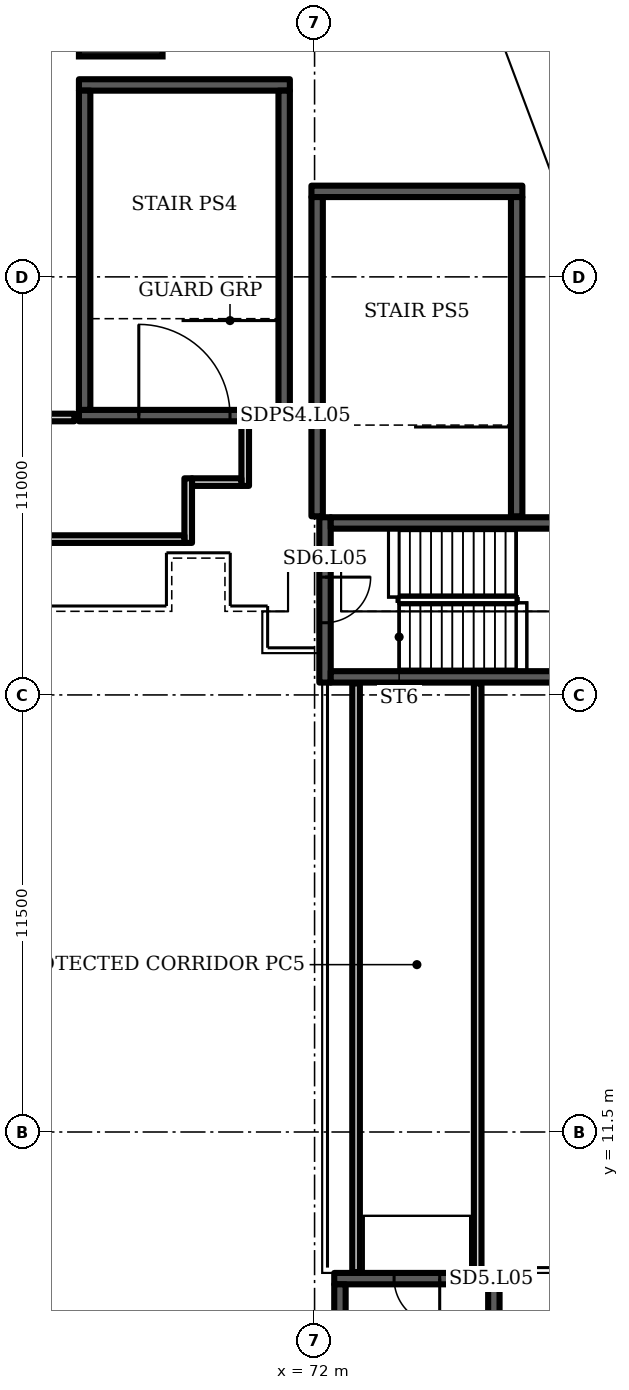
"""IFC4 building model, lengths in metres.
Left out: names, types, materials, properties, quantities, classifications, styles, units other than length and angle.
Written with IfcOpenShell. Run it as: python <this file> out.ifc"""

import sys

from ifc_helpers import new_model, si_unit, direction, frame, frame_2d, origin, origin_2d, place, context, subcontext, project, spatial, rectangle, extrude, element, fill, save


model = new_model("IFC4")
c1 = context("Model", 3, precision=1e-05, world=origin(), true_north=direction((0.0, 1.0)))
c2 = subcontext(c1, "Body", "Model", "MODEL_VIEW")
j1 = project(units=[si_unit("LENGTHUNIT", "METRE"), si_unit("PLANEANGLEUNIT", "RADIAN")], contexts=[c1])
p1 = place(None, origin())
s1 = spatial("IfcSite", under=j1, at=p1, CompositionType="ELEMENT")
p2 = place(p1, origin())
s2 = spatial("IfcBuilding", under=s1, at=p2, CompositionType="ELEMENT")
p3 = place(p2, frame((0.0, 0.0, 33.0)))
s3 = spatial("IfcBuildingStorey", under=s2, at=p3, CompositionType="ELEMENT", Elevation=33.0)
p4 = place(p3, frame((66.9, 40.9, 0.0), z_axis=(0.0, 0.0, 1.0), x_axis=(1.0, 0.0, 0.0)))
e1 = element("IfcColumn", 1, at=p4, inside=s3, PredefinedType="COLUMN", context=c2, shape_type="SweptSolid", body=[
    extrude(rectangle(XDim=2.2, YDim=2.2, at=origin_2d()), origin(), (0.0, 0.0, 1.0), 8.5),
])
p5 = place(p3, frame((72.518, 7.642, 0.0), z_axis=(0.0, 0.0, 1.0), x_axis=(1.0, 0.0, 0.0)))
e2 = element("IfcWall", 2, at=p5, inside=s3, PredefinedType="SHEAR", context=c2, shape_type="SweptSolid", body=[
    extrude(rectangle(XDim=4.35, YDim=0.3, at=frame_2d((2.175, 0.0))), origin(), (0.0, 0.0, 1.0), 8.1),
])
p6 = place(p5, frame((1.575, 0.0, 0.0)))
e3 = element("IfcOpeningElement", 3, at=p6, cuts=e2, PredefinedType="OPENING", context=c2, shape_type="SweptSolid", body=[
    extrude(rectangle(XDim=1.2, YDim=2.1, at=frame_2d((0.6, 1.05))), frame((0.0, 0.16, 0.0), z_axis=(0.0, -1.0, 0.0), x_axis=(1.0, 0.0, 0.0)), (0.0, 0.0, 1.0), 0.32),
])
p7 = place(p3, frame((72.275, 23.325, 0.0), z_axis=(0.0, 0.0, 1.0), x_axis=(0.0, 1.0, 0.0)))
e4 = element("IfcWall", 4, at=p7, inside=s3, PredefinedType="SHEAR", context=c2, shape_type="SweptSolid", body=[
    extrude(rectangle(XDim=4.35, YDim=0.3, at=frame_2d((2.175, 0.0))), origin(), (0.0, 0.0, 1.0), 8.1),
])
p8 = place(p7, frame((1.575, 0.0, 0.0)))
e5 = element("IfcOpeningElement", 5, at=p8, cuts=e4, PredefinedType="OPENING", context=c2, shape_type="SweptSolid", body=[
    extrude(rectangle(XDim=1.2, YDim=2.1, at=frame_2d((0.6, 1.05))), frame((0.0, 0.16, 0.0), z_axis=(0.0, -1.0, 0.0), x_axis=(1.0, 0.0, 0.0)), (0.0, 0.0, 1.0), 0.32),
])
p9 = place(p3, frame((65.8, 30.35, 0.0), z_axis=(0.0, 0.0, 1.0), x_axis=(1.0, 0.0, 0.0)))
e6 = element("IfcWall", 6, at=p9, inside=s3, PredefinedType="SHEAR", context=c2, shape_type="SweptSolid", body=[
    extrude(rectangle(XDim=5.55, YDim=0.3, at=frame_2d((2.775, 0.0))), origin(), (0.0, 0.0, 1.0), 8.1),
])
p10 = place(p9, frame((1.575, 0.0, 0.0)))
e7 = element("IfcOpeningElement", 7, at=p10, cuts=e6, PredefinedType="OPENING", context=c2, shape_type="SweptSolid", body=[
    extrude(rectangle(XDim=2.4, YDim=2.1, at=frame_2d((1.2, 1.05))), frame((0.0, 0.16, 0.0), z_axis=(0.0, -1.0, 0.0), x_axis=(1.0, 0.0, 0.0)), (0.0, 0.0, 1.0), 0.32),
])
p11 = place(p3, frame((65.8, 39.05, 0.0), z_axis=(0.0, 0.0, 1.0), x_axis=(1.0, 0.0, 0.0)))
e8 = element("IfcWall", 8, at=p11, inside=s3, PredefinedType="SHEAR", context=c2, shape_type="SweptSolid", body=[
    extrude(rectangle(XDim=5.55, YDim=0.3, at=frame_2d((2.775, 0.0))), origin(), (0.0, 0.0, 1.0), 8.1),
])
for number, where, z_axis, x_axis in (
    (9, (65.95, 30.5, 0.0), (0.0, 0.0, 1.0), (0.0, 1.0, 0.0)),
    (10, (71.2, 30.5, 0.0), (0.0, 0.0, 1.0), (0.0, 1.0, 0.0)),
):
    element("IfcWall", number, at=place(p3, frame(where, z_axis=z_axis, x_axis=x_axis)), inside=s3, PredefinedType="SHEAR", context=c2, shape_type="SweptSolid", body=[
        extrude(rectangle(XDim=8.4, YDim=0.3, at=frame_2d((4.2, 0.0))), origin(), (0.0, 0.0, 1.0), 8.1),
    ])
p12 = place(p3, frame((71.917, 36.25, 0.0), z_axis=(0.0, 0.0, 1.0), x_axis=(1.0, 0.0, 0.0)))
e11 = element("IfcWall", 11, at=p12, inside=s3, PredefinedType="SHEAR", context=c2, shape_type="SweptSolid", body=[
    extrude(rectangle(XDim=5.55, YDim=0.3, at=frame_2d((2.775, 0.0))), origin(), (0.0, 0.0, 1.0), 8.1),
])
for number, where, z_axis, x_axis in (
    (12, (72.067, 27.7, 0.0), (0.0, 0.0, 1.0), (0.0, 1.0, 0.0)),
    (13, (77.317, 27.7, 0.0), (0.0, 0.0, 1.0), (0.0, 1.0, 0.0)),
):
    element("IfcWall", number, at=place(p3, frame(where, z_axis=z_axis, x_axis=x_axis)), inside=s3, PredefinedType="SHEAR", context=c2, shape_type="SweptSolid", body=[
        extrude(rectangle(XDim=8.4, YDim=0.3, at=frame_2d((4.2, 0.0))), origin(), (0.0, 0.0, 1.0), 8.1),
    ])
p13 = place(p3, frame((70.175, 28.5, 0.0), z_axis=(0.0, 0.0, 1.0), x_axis=(0.0, 1.0, 0.0)))
e14 = element("IfcWall", 14, at=p13, inside=s3, PredefinedType="PARTITIONING", context=c2, shape_type="SweptSolid", body=[
    extrude(rectangle(XDim=1.68, YDim=0.2, at=frame_2d((0.84, 0.0))), origin(), (0.0, 0.0, 1.0), 8.1),
])
p14 = place(p3, frame((68.775, 28.6, 0.0), z_axis=(0.0, 0.0, 1.0), x_axis=(1.0, 0.0, 0.0)))
e15 = element("IfcWall", 15, at=p14, inside=s3, PredefinedType="PARTITIONING", context=c2, shape_type="SweptSolid", body=[
    extrude(rectangle(XDim=1.3, YDim=0.2, at=frame_2d((0.65, 0.0))), origin(), (0.0, 0.0, 1.0), 8.1),
])
p15 = place(p3, frame((68.675, 27.0, 0.0), z_axis=(0.0, 0.0, 1.0), x_axis=(0.0, 1.0, 0.0)))
e16 = element("IfcWall", 16, at=p15, inside=s3, PredefinedType="PARTITIONING", context=c2, shape_type="SweptSolid", body=[
    extrude(rectangle(XDim=1.7, YDim=0.2, at=frame_2d((0.85, 0.0))), origin(), (0.0, 0.0, 1.0), 8.1),
])
p16 = place(p3, frame((41.083, 27.1, 0.0), z_axis=(0.0, 0.0, 1.0), x_axis=(1.0, 0.0, 0.0)))
e17 = element("IfcWall", 17, at=p16, inside=s3, PredefinedType="PARTITIONING", context=c2, shape_type="SweptSolid", body=[
    extrude(rectangle(XDim=27.492, YDim=0.2, at=frame_2d((13.746, 0.0))), origin(), (0.0, 0.0, 1.0), 8.1),
])
for number, where, z_axis, x_axis in (
    (18, (73.092, 7.812, 0.0), (0.0, 0.0, 1.0), (0.0, 1.0, 0.0)),
    (19, (76.292, 7.812, 0.0), (0.0, 0.0, 1.0), (0.0, 1.0, 0.0)),
):
    element("IfcWall", number, at=place(p3, frame(where, z_axis=z_axis, x_axis=x_axis)), inside=s3, PredefinedType="PARTITIONING", context=c2, shape_type="SweptSolid", body=[
        extrude(rectangle(XDim=15.493, YDim=0.2, at=frame_2d((7.747, 0.0))), origin(), (0.0, 0.0, 1.0), 8.1),
    ])
p17 = place(p3, frame((44.15, 30.3, 0.0), z_axis=(0.0, 0.0, 1.0), x_axis=(1.0, 0.0, 0.0)))
e20 = element("IfcWall", 20, at=p17, inside=s3, PredefinedType="PARTITIONING", context=c2, shape_type="SweptSolid", body=[
    extrude(rectangle(XDim=21.53, YDim=0.2, at=frame_2d((10.765, 0.0))), origin(), (0.0, 0.0, 1.0), 8.1),
])
for number, where, z_axis, x_axis in (
    (21, (72.667, -0.008, 0.0), (0.0, 0.0, 1.0), (0.0, 1.0, 0.0)),
    (22, (76.718, -0.008, 0.0), (0.0, 0.0, 1.0), (0.0, 1.0, 0.0)),
    (23, (72.425, 23.475, 0.0), (0.0, 0.0, 1.0), (1.0, 0.0, 0.0)),
    (24, (72.425, 27.525, 0.0), (0.0, 0.0, 1.0), (1.0, 0.0, 0.0)),
):
    element("IfcWall", number, at=place(p3, frame(where, z_axis=z_axis, x_axis=x_axis)), inside=s3, PredefinedType="SHEAR", context=c2, shape_type="SweptSolid", body=[
        extrude(rectangle(XDim=7.5, YDim=0.3, at=frame_2d((3.75, 0.0))), origin(), (0.0, 0.0, 1.0), 8.1),
    ])
p18 = place(p6, origin())
e25 = element("IfcDoor", 25, at=p18, inside=s3, OperationType="SINGLE_SWING_RIGHT", PredefinedType="DOOR", context=c2, shape_type="SweptSolid", body=[
    extrude(rectangle(XDim=1.2, YDim=2.1, at=frame_2d((0.6, 1.05))), frame((0.0, 0.025, 0.0), z_axis=(0.0, -1.0, 0.0), x_axis=(1.0, 0.0, 0.0)), (0.0, 0.0, 1.0), 0.05),
])
fill(e3, e25)
p19 = place(p8, origin())
e26 = element("IfcDoor", 26, at=p19, inside=s3, OperationType="SINGLE_SWING_RIGHT", PredefinedType="DOOR", context=c2, shape_type="SweptSolid", body=[
    extrude(rectangle(XDim=1.2, YDim=2.1, at=frame_2d((0.6, 1.05))), frame((0.0, 0.025, 0.0), z_axis=(0.0, -1.0, 0.0), x_axis=(1.0, 0.0, 0.0)), (0.0, 0.0, 1.0), 0.05),
])
fill(e5, e26)
p20 = place(p10, origin())
e27 = element("IfcDoor", 27, at=p20, inside=s3, OperationType="DOUBLE_DOOR_SINGLE_SWING", PredefinedType="DOOR", context=c2, shape_type="SweptSolid", body=[
    extrude(rectangle(XDim=2.4, YDim=2.1, at=frame_2d((1.2, 1.05))), frame((0.0, 0.025, 0.0), z_axis=(0.0, -1.0, 0.0), x_axis=(1.0, 0.0, 0.0)), (0.0, 0.0, 1.0), 0.05),
])
fill(e7, e27)
save(model, sys.argv[1])
